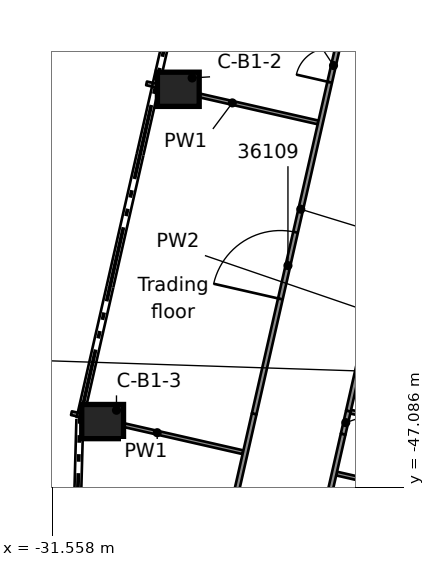
"""IFC4 building model, lengths in metres.
Left out: names, types, materials, properties, quantities, classifications, styles, units other than length and angle.
Written with IfcOpenShell. Run it as: python <this file> out.ifc"""

import sys

from ifc_helpers import new_model, si_unit, direction, frame, frame_2d, origin, origin_2d, place, context, subcontext, project, spatial, rectangle, extrude, element, fill, save


model = new_model("IFC4")
c1 = context("Model", 3, precision=1e-05, world=origin(), true_north=direction((0.0, 1.0)))
c2 = subcontext(c1, "Body", "Model", "MODEL_VIEW")
j1 = project(units=[si_unit("LENGTHUNIT", "METRE"), si_unit("PLANEANGLEUNIT", "RADIAN")], contexts=[c1])
p1 = place(None, origin())
s1 = spatial("IfcSite", under=j1, at=p1, CompositionType="ELEMENT")
p2 = place(p1, origin())
s2 = spatial("IfcBuilding", under=s1, at=p2, CompositionType="ELEMENT")
p3 = place(p2, frame((0.0, 0.0, 181.1)))
s3 = spatial("IfcBuildingStorey", under=s2, at=p3, CompositionType="ELEMENT", Elevation=181.1)
for number, where, z_axis, x_axis in (
    (1, (-28.237, -36.609, 0.0), (0.0, 0.0, 1.0), (1.0, 0.0, 0.0)),
    (2, (-30.228, -45.352, 0.0), (0.0, 0.0, 1.0), (1.0, 0.0, 0.0)),
):
    element("IfcColumn", number, at=place(p3, frame(where, z_axis=z_axis, x_axis=x_axis)), inside=s3, PredefinedType="COLUMN", context=c2, shape_type="SweptSolid", body=[
        extrude(rectangle(XDim=1.1, YDim=0.9, at=origin_2d()), origin(), (0.0, 0.0, 1.0), 3.5),
    ])
p4 = place(p3, frame((-31.049, -45.131, 0.0), z_axis=(0.0, 0.0, 1.0), x_axis=(0.975044716765, -0.22200855909, 0.0)))
e3 = element("IfcWall", 3, at=p4, inside=s3, PredefinedType="PARTITIONING", context=c2, shape_type="SweptSolid", body=[
    extrude(rectangle(XDim=4.63, YDim=0.1, at=frame_2d((2.315, 0.0))), origin(), (0.0, 0.0, 1.0), 3.06),
])
p5 = place(p3, frame((-24.072, -46.72, 0.0), z_axis=(0.0, 0.0, 1.0), x_axis=(0.975013747988, -0.222144527805, 0.0)))
e4 = element("IfcWall", 4, at=p5, inside=s3, PredefinedType="PARTITIONING", context=c2, shape_type="SweptSolid", body=[
    extrude(rectangle(XDim=26.186, YDim=0.1, at=frame_2d((13.093, 0.0))), origin(), (0.0, 0.0, 1.0), 3.06),
])
p6 = place(p3, frame((-23.701, -45.092, 0.0), z_axis=(0.0, 0.0, 1.0), x_axis=(0.9750468239, -0.22199930451, 0.0)))
e5 = element("IfcWall", 5, at=p6, inside=s3, PredefinedType="PARTITIONING", context=c2, shape_type="SweptSolid", body=[
    extrude(rectangle(XDim=5.887, YDim=0.1, at=frame_2d((2.943, 0.0))), origin(), (0.0, 0.0, 1.0), 3.06),
])
p7 = place(p3, frame((-29.073, -36.453, 0.0), z_axis=(0.0, 0.0, 1.0), x_axis=(0.975041099452, -0.222024445455, 0.0)))
e6 = element("IfcWall", 6, at=p7, inside=s3, PredefinedType="PARTITIONING", context=c2, shape_type="SweptSolid", body=[
    extrude(rectangle(XDim=4.63, YDim=0.1, at=frame_2d((2.315, 0.0))), origin(), (0.0, 0.0, 1.0), 3.06),
])
p8 = place(p3, frame((-23.899, -45.681, 0.0), z_axis=(0.0, 0.0, 1.0), x_axis=(-0.222219189768, -0.974996734199, 0.0)))
e7 = element("IfcWall", 7, at=p8, inside=s3, PredefinedType="PARTITIONING", context=c2, shape_type="SweptSolid", body=[
    extrude(rectangle(XDim=3.952, YDim=0.125, at=frame_2d((1.976, 0.0))), origin(), (0.0, 0.0, 1.0), 3.06),
])
p9 = place(p3, frame((-26.24, -45.148, 0.0), z_axis=(0.0, 0.0, 1.0), x_axis=(-0.222031920234, -0.975039397356, 0.0)))
e8 = element("IfcWall", 8, at=p9, inside=s3, PredefinedType="PARTITIONING", context=c2, shape_type="SweptSolid", body=[
    extrude(rectangle(XDim=5.368, YDim=0.125, at=frame_2d((2.684, 0.0))), origin(), (0.0, 0.0, 1.0), 3.06),
])
p10 = place(p3, frame((-23.022, -41.829, 0.0), z_axis=(0.0, 0.0, 1.0), x_axis=(-0.222150102986, -0.975012477737, 0.0)))
e9 = element("IfcWall", 9, at=p10, inside=s3, PredefinedType="PARTITIONING", context=c2, shape_type="SweptSolid", body=[
    extrude(rectangle(XDim=3.331, YDim=0.125, at=frame_2d((1.666, 0.0))), origin(), (0.0, 0.0, 1.0), 3.06),
])
p11 = place(p10, frame((1.1, 0.0, 0.0)))
e10 = element("IfcOpeningElement", 10, at=p11, cuts=e9, PredefinedType="OPENING", context=c2, shape_type="SweptSolid", body=[
    extrude(rectangle(XDim=1.1, YDim=2.1, at=frame_2d((0.55, 1.05))), frame((0.0, 0.073, 0.0), z_axis=(0.0, -1.0, 0.0), x_axis=(1.0, 0.0, 0.0)), (0.0, 0.0, 1.0), 0.145),
])
p12 = place(p3, frame((-23.899, -45.681, 0.0), z_axis=(0.0, 0.0, 1.0), x_axis=(0.221484587938, 0.975163872027, 0.0)))
e11 = element("IfcWall", 11, at=p12, inside=s3, PredefinedType="PARTITIONING", context=c2, shape_type="SweptSolid", body=[
    extrude(rectangle(XDim=0.618, YDim=0.125, at=frame_2d((0.309, 0.0))), origin(), (0.0, 0.0, 1.0), 3.06),
])
p13 = place(p3, frame((-26.24, -45.148, 0.0), z_axis=(0.0, 0.0, 1.0), x_axis=(0.22206165199, 0.975032626488, 0.0)))
e12 = element("IfcWall", 12, at=p13, inside=s3, PredefinedType="PARTITIONING", context=c2, shape_type="SweptSolid", body=[
    extrude(rectangle(XDim=11.042, YDim=0.125, at=frame_2d((5.521, 0.0))), origin(), (0.0, 0.0, 1.0), 3.06),
])
p14 = place(p13, frame((8.949, 0.0, 0.0)))
e13 = element("IfcOpeningElement", 13, at=p14, cuts=e12, PredefinedType="OPENING", context=c2, shape_type="SweptSolid", body=[
    extrude(rectangle(XDim=0.9, YDim=2.1, at=frame_2d((0.45, 1.05))), frame((0.0, 0.073, 0.0), z_axis=(0.0, -1.0, 0.0), x_axis=(1.0, 0.0, 0.0)), (0.0, 0.0, 1.0), 0.145),
])
p15 = place(p13, frame((3.1, 0.0, 0.0)))
e14 = element("IfcOpeningElement", 14, at=p15, cuts=e12, PredefinedType="OPENING", context=c2, shape_type="SweptSolid", body=[
    extrude(rectangle(XDim=1.8, YDim=2.1, at=frame_2d((0.9, 1.05))), frame((0.0, 0.073, 0.0), z_axis=(0.0, -1.0, 0.0), x_axis=(1.0, 0.0, 0.0)), (0.0, 0.0, 1.0), 0.145),
])
p16 = place(p14, origin())
e15 = element("IfcDoor", 15, at=p16, inside=s3, OperationType="SINGLE_SWING_RIGHT", PredefinedType="DOOR", context=c2, shape_type="SweptSolid", body=[
    extrude(rectangle(XDim=0.9, YDim=2.1, at=frame_2d((0.45, 1.05))), frame((0.0, 0.025, 0.0), z_axis=(0.0, -1.0, 0.0), x_axis=(1.0, 0.0, 0.0)), (0.0, 0.0, 1.0), 0.05),
])
fill(e13, e15)
p17 = place(p15, origin())
e16 = element("IfcDoor", 16, at=p17, inside=s3, OperationType="DOUBLE_DOOR_SINGLE_SWING", PredefinedType="DOOR", context=c2, shape_type="SweptSolid", body=[
    extrude(rectangle(XDim=1.8, YDim=2.1, at=frame_2d((0.9, 1.05))), frame((0.0, 0.025, 0.0), z_axis=(0.0, -1.0, 0.0), x_axis=(1.0, 0.0, 0.0)), (0.0, 0.0, 1.0), 0.05),
])
fill(e14, e16)
save(model, sys.argv[1])
